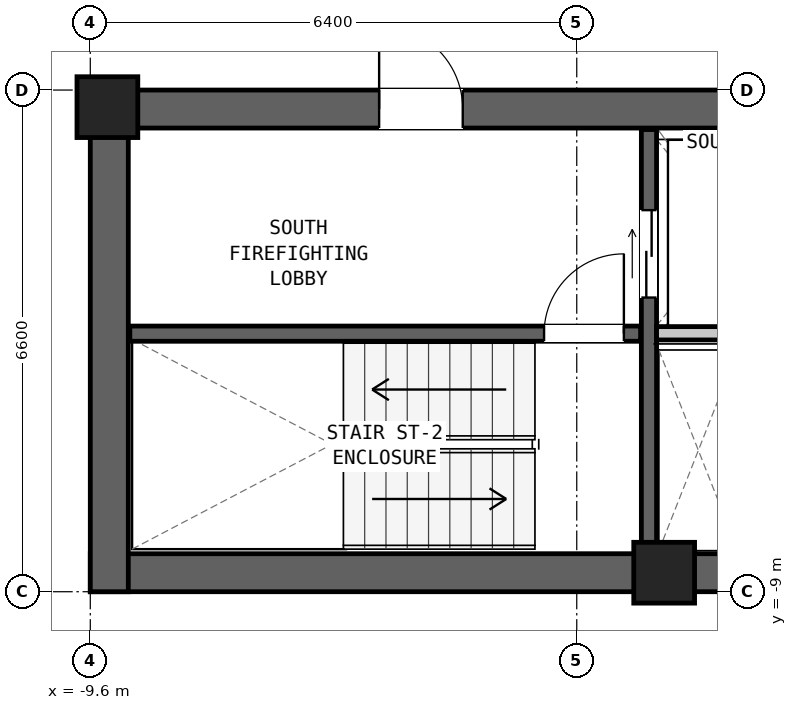
"""IFC4 building model, lengths in metres.
Left out: names, types, materials, properties, quantities, classifications, styles, units other than length and angle.
Written with IfcOpenShell. Run it as: python <this file> out.ifc"""

import sys

from ifc_helpers import new_model, si_unit, direction, frame, frame_2d, origin, origin_2d, place, context, subcontext, project, spatial, rectangle, extrude, element, fill, save


model = new_model("IFC4")
c1 = context("Model", 3, precision=1e-05, world=origin(), true_north=direction((0.0, 1.0)))
c2 = subcontext(c1, "Body", "Model", "MODEL_VIEW")
j1 = project(units=[si_unit("LENGTHUNIT", "METRE"), si_unit("PLANEANGLEUNIT", "RADIAN")], contexts=[c1])
p1 = place(None, origin())
s1 = spatial("IfcSite", under=j1, at=p1, CompositionType="ELEMENT")
p2 = place(p1, origin())
s2 = spatial("IfcBuilding", under=s1, at=p2, CompositionType="ELEMENT")
p3 = place(p2, frame((0.0, 0.0, 148.2)))
s3 = spatial("IfcBuildingStorey", under=s2, at=p3, CompositionType="ELEMENT", Elevation=148.2)
p4 = place(p3, frame((-9.6, -8.75, 0.0), z_axis=(0.0, 0.0, 1.0), x_axis=(1.0, 0.0, 0.0)))
e1 = element("IfcWall", 1, at=p4, inside=s3, PredefinedType="SHEAR", context=c2, shape_type="SweptSolid", body=[
    extrude(rectangle(XDim=19.2, YDim=0.5, at=frame_2d((9.6, 0.0))), origin(), (0.0, 0.0, 1.0), 3.6),
])
p5 = place(p3, frame((-9.6, -2.65, 0.0), z_axis=(0.0, 0.0, 1.0), x_axis=(1.0, 0.0, 0.0)))
e2 = element("IfcWall", 2, at=p5, inside=s3, PredefinedType="SHEAR", context=c2, shape_type="SweptSolid", body=[
    extrude(rectangle(XDim=19.2, YDim=0.5, at=frame_2d((9.6, 0.0))), origin(), (0.0, 0.0, 1.0), 3.6),
])
p6 = place(p5, frame((3.8, 0.0, 0.0)))
e3 = element("IfcOpeningElement", 3, at=p6, cuts=e2, PredefinedType="OPENING", context=c2, shape_type="SweptSolid", body=[
    extrude(rectangle(XDim=1.1, YDim=2.08, at=frame_2d((0.55, 1.04))), frame((0.0, 0.262, 0.0), z_axis=(0.0, -1.0, 0.0), x_axis=(1.0, 0.0, 0.0)), (0.0, 0.0, 1.0), 0.524),
])
p7 = place(p5, frame((13.0, 0.0, 0.0)))
e4 = element("IfcOpeningElement", 4, at=p7, cuts=e2, PredefinedType="OPENING", context=c2, shape_type="SweptSolid", body=[
    extrude(rectangle(XDim=1.6, YDim=2.12, at=frame_2d((0.8, 1.06))), frame((0.0, 0.262, 0.0), z_axis=(0.0, -1.0, 0.0), x_axis=(1.0, 0.0, 0.0)), (0.0, 0.0, 1.0), 0.524),
])
p8 = place(p3, frame((-9.35, -9.0, 0.0), z_axis=(0.0, 0.0, 1.0), x_axis=(0.0, 1.0, 0.0)))
e5 = element("IfcWall", 5, at=p8, inside=s3, PredefinedType="SHEAR", context=c2, shape_type="SweptSolid", body=[
    extrude(rectangle(XDim=6.6, YDim=0.5, at=frame_2d((3.3, 0.0))), origin(), (0.0, 0.0, 1.0), 3.6),
])
for number, where, z_axis, x_axis in (
    (6, (-9.375, -2.625, 0.0), (0.0, 0.0, 1.0), (1.0, 0.0, 0.0)),
    (7, (-2.05, -8.75, 0.0), (0.0, 0.0, 1.0), (1.0, 0.0, 0.0)),
):
    element("IfcColumn", number, at=place(p3, frame(where, z_axis=z_axis, x_axis=x_axis)), inside=s3, PredefinedType="COLUMN", context=c2, shape_type="SweptSolid", body=[
        extrude(rectangle(XDim=0.8, YDim=0.8, at=origin_2d()), origin(), (0.0, 0.0, 1.0), 3.6),
    ])
p9 = place(p3, frame((-9.08, -5.605, 0.0), z_axis=(0.0, 0.0, 1.0), x_axis=(1.0, 0.0, 0.0)))
e8 = element("IfcWall", 8, at=p9, inside=s3, PredefinedType="SHEAR", context=c2, shape_type="SweptSolid", body=[
    extrude(rectangle(XDim=6.72, YDim=0.2, at=frame_2d((3.36, 0.0))), origin(), (0.0, 0.0, 1.0), 3.22),
])
p10 = place(p9, frame((5.45, 0.0, 0.0)))
e9 = element("IfcOpeningElement", 9, at=p10, cuts=e8, PredefinedType="OPENING", context=c2, shape_type="SweptSolid", body=[
    extrude(rectangle(XDim=1.05, YDim=2.08, at=frame_2d((0.525, 1.04))), frame((0.0, 0.112, 0.0), z_axis=(0.0, -1.0, 0.0), x_axis=(1.0, 0.0, 0.0)), (0.0, 0.0, 1.0), 0.224),
])
p11 = place(p3, frame((-2.25, -8.48, 0.0), z_axis=(0.0, 0.0, 1.0), x_axis=(0.0, 1.0, 0.0)))
e10 = element("IfcWall", 10, at=p11, inside=s3, PredefinedType="SHEAR", context=c2, shape_type="SweptSolid", body=[
    extrude(rectangle(XDim=5.56, YDim=0.2, at=frame_2d((2.78, 0.0))), origin(), (0.0, 0.0, 1.0), 3.22),
])
p12 = place(p11, frame((3.35, 0.0, 0.0)))
e11 = element("IfcOpeningElement", 11, at=p12, cuts=e10, PredefinedType="OPENING", context=c2, shape_type="SweptSolid", body=[
    extrude(rectangle(XDim=1.15, YDim=2.08, at=frame_2d((0.575, 1.04))), frame((0.0, 0.112, 0.0), z_axis=(0.0, -1.0, 0.0), x_axis=(1.0, 0.0, 0.0)), (0.0, 0.0, 1.0), 0.224),
])
p13 = place(p3, frame((-2.15, -5.6, 0.0), z_axis=(0.0, 0.0, 1.0), x_axis=(1.0, 0.0, 0.0)))
e12 = element("IfcWall", 12, at=p13, inside=s3, PredefinedType="PARTITIONING", context=c2, shape_type="SweptSolid", body=[
    extrude(rectangle(XDim=1.97, YDim=0.175, at=frame_2d((0.985, 0.0))), origin(), (0.0, 0.0, 1.0), 3.22),
])
p14 = place(p10, origin())
e13 = element("IfcDoor", 13, at=p14, inside=s3, OperationType="SINGLE_SWING_RIGHT", PredefinedType="DOOR", context=c2, shape_type="SweptSolid", body=[
    extrude(rectangle(XDim=1.05, YDim=2.08, at=frame_2d((0.525, 1.04))), frame((0.0, 0.025, 0.0), z_axis=(0.0, -1.0, 0.0), x_axis=(1.0, 0.0, 0.0)), (0.0, 0.0, 1.0), 0.05),
])
fill(e9, e13)
p15 = place(p6, origin())
e14 = element("IfcDoor", 14, at=p15, inside=s3, OperationType="SINGLE_SWING_LEFT", PredefinedType="DOOR", context=c2, shape_type="SweptSolid", body=[
    extrude(rectangle(XDim=1.1, YDim=2.08, at=frame_2d((0.55, 1.04))), frame((0.0, 0.025, 0.0), z_axis=(0.0, -1.0, 0.0), x_axis=(1.0, 0.0, 0.0)), (0.0, 0.0, 1.0), 0.05),
])
fill(e3, e14)
p16 = place(p12, origin())
e15 = element("IfcDoor", 15, at=p16, inside=s3, OperationType="DOUBLE_DOOR_SLIDING", PredefinedType="DOOR", context=c2, shape_type="SweptSolid", body=[
    extrude(rectangle(XDim=1.15, YDim=2.08, at=frame_2d((0.575, 1.04))), frame((0.0, 0.025, 0.0), z_axis=(0.0, -1.0, 0.0), x_axis=(1.0, 0.0, 0.0)), (0.0, 0.0, 1.0), 0.05),
])
fill(e11, e15)
save(model, sys.argv[1])
